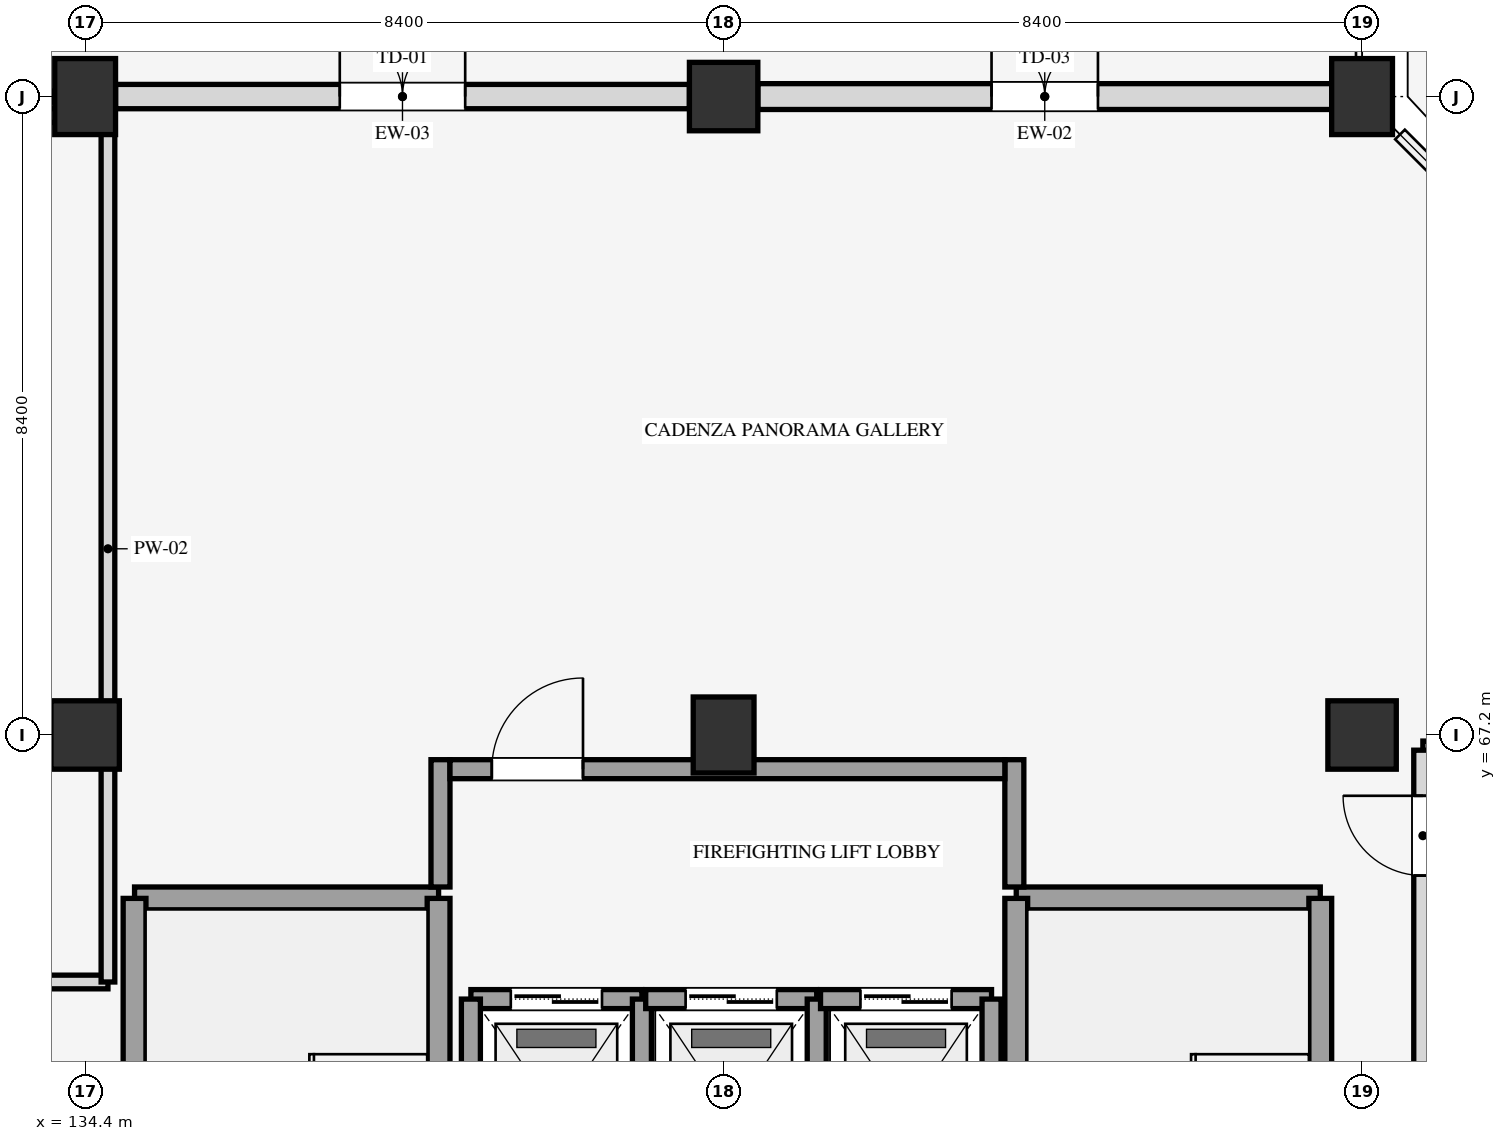
"""IFC4 building model, lengths in metres.
Left out: names, types, materials, properties, quantities, classifications, styles, units other than length and angle.
Written with IfcOpenShell. Run it as: python <this file> out.ifc"""

import sys

from ifc_helpers import new_model, si_unit, direction, frame, frame_2d, origin, origin_2d, place, context, subcontext, project, spatial, rectangle, extrude, element, fill, save


model = new_model("IFC4")
c1 = context("Model", 3, precision=1e-05, world=origin(), true_north=direction((0.0, 1.0)))
c2 = subcontext(c1, "Body", "Model", "MODEL_VIEW")
j1 = project(units=[si_unit("LENGTHUNIT", "METRE"), si_unit("PLANEANGLEUNIT", "RADIAN")], contexts=[c1])
p1 = place(None, origin())
s1 = spatial("IfcSite", under=j1, at=p1, CompositionType="ELEMENT")
p2 = place(p1, origin())
s2 = spatial("IfcBuilding", under=s1, at=p2, CompositionType="ELEMENT")
p3 = place(p2, frame((0.0, 0.0, 69.9)))
s3 = spatial("IfcBuildingStorey", under=s2, at=p3, CompositionType="ELEMENT", Elevation=69.9)
p4 = place(p3, frame((134.4, 67.2, 0.0), z_axis=(0.0, 0.0, 1.0), x_axis=(1.0, 0.0, 0.0)))
e1 = element("IfcColumn", 1, at=p4, inside=s3, PredefinedType="COLUMN", context=c2, shape_type="SweptSolid", body=[
    extrude(rectangle(XDim=0.9, YDim=0.9, at=origin_2d()), origin(), (0.0, 0.0, 1.0), 4.5),
])
for number, where, z_axis, x_axis in (
    (2, (134.4, 75.6, 0.0), (0.0, 0.0, 1.0), (1.0, 0.0, 0.0)),
    (3, (142.8, 67.2, 0.0), (0.0, 0.0, 1.0), (1.0, 0.0, 0.0)),
):
    element("IfcColumn", number, at=place(p3, frame(where, z_axis=z_axis, x_axis=x_axis)), inside=s3, PredefinedType="COLUMN", context=c2, shape_type="SweptSolid", body=[
        extrude(rectangle(XDim=0.8, YDim=1.0, at=origin_2d()), origin(), (0.0, 0.0, 1.0), 4.5),
    ])
for number, where, z_axis, x_axis in (
    (4, (142.8, 75.6, 0.0), (0.0, 0.0, 1.0), (1.0, 0.0, 0.0)),
    (5, (151.2, 67.2, 0.0), (0.0, 0.0, 1.0), (1.0, 0.0, 0.0)),
):
    element("IfcColumn", number, at=place(p3, frame(where, z_axis=z_axis, x_axis=x_axis)), inside=s3, PredefinedType="COLUMN", context=c2, shape_type="SweptSolid", body=[
        extrude(rectangle(XDim=0.9, YDim=0.9, at=origin_2d()), origin(), (0.0, 0.0, 1.0), 4.5),
    ])
p5 = place(p3, frame((151.2, 75.6, 0.0), z_axis=(0.0, 0.0, 1.0), x_axis=(1.0, 0.0, 0.0)))
e6 = element("IfcColumn", 6, at=p5, inside=s3, PredefinedType="COLUMN", context=c2, shape_type="SweptSolid", body=[
    extrude(rectangle(XDim=0.8, YDim=1.0, at=origin_2d()), origin(), (0.0, 0.0, 1.0), 4.5),
])
p6 = place(p3, frame((150.8, 75.6, 0.0), z_axis=(0.0, 0.0, 1.0), x_axis=(-1.0, 0.0, 0.0)))
e7 = element("IfcWall", 7, at=p6, inside=s3, PredefinedType="STANDARD", context=c2, shape_type="SweptSolid", body=[
    extrude(rectangle(XDim=7.55, YDim=0.34, at=frame_2d((3.775, 0.0))), origin(), (0.0, 0.0, 1.0), 3.68),
])
p7 = place(p6, frame((3.075, 0.0, 0.0)))
e8 = element("IfcOpeningElement", 8, at=p7, cuts=e7, PredefinedType="OPENING", context=c2, shape_type="SweptSolid", body=[
    extrude(rectangle(XDim=1.4, YDim=2.15, at=frame_2d((0.7, 1.075))), frame((0.0, 0.18, 0.0), z_axis=(0.0, -1.0, 0.0), x_axis=(1.0, 0.0, 0.0)), (0.0, 0.0, 1.0), 0.36),
])
p8 = place(p3, frame((142.35, 75.6, 0.0), z_axis=(0.0, 0.0, 1.0), x_axis=(-1.0, 0.0, 0.0)))
e9 = element("IfcWall", 9, at=p8, inside=s3, PredefinedType="STANDARD", context=c2, shape_type="SweptSolid", body=[
    extrude(rectangle(XDim=7.55, YDim=0.32, at=frame_2d((3.775, 0.0))), origin(), (0.0, 0.0, 1.0), 3.68),
])
p9 = place(p8, frame((2.95, 0.0, 0.0)))
e10 = element("IfcOpeningElement", 10, at=p9, cuts=e9, PredefinedType="OPENING", context=c2, shape_type="SweptSolid", body=[
    extrude(rectangle(XDim=1.65, YDim=2.2, at=frame_2d((0.825, 1.1))), frame((0.0, 0.17, 0.0), z_axis=(0.0, -1.0, 0.0), x_axis=(1.0, 0.0, 0.0)), (0.0, 0.0, 1.0), 0.34),
])
p10 = place(p3, frame((135.05, 65.05, 0.0), z_axis=(0.0, 0.0, 1.0), x_axis=(1.0, 0.0, 0.0)))
e11 = element("IfcWall", 11, at=p10, inside=s3, PredefinedType="SHEAR", context=c2, shape_type="SweptSolid", body=[
    extrude(rectangle(XDim=4.0, YDim=0.3, at=frame_2d((2.0, 0.0))), origin(), (0.0, 0.0, 1.0), 4.5),
])
for number, where, z_axis, x_axis in (
    (12, (135.05, 50.75, 0.0), (0.0, 0.0, 1.0), (0.0, 1.0, 0.0)),
    (13, (139.05, 50.75, 0.0), (0.0, 0.0, 1.0), (0.0, 1.0, 0.0)),
):
    element("IfcWall", number, at=place(p3, frame(where, z_axis=z_axis, x_axis=x_axis)), inside=s3, PredefinedType="SHEAR", context=c2, shape_type="SweptSolid", body=[
        extrude(rectangle(XDim=14.3, YDim=0.3, at=frame_2d((7.15, 0.0))), origin(), (0.0, 0.0, 1.0), 4.5),
    ])
p11 = place(p3, frame((137.25, 52.4, 0.0), z_axis=(0.0, 0.0, 1.0), x_axis=(0.0, 1.0, 0.0)))
e14 = element("IfcWall", 14, at=p11, inside=s3, PredefinedType="SHEAR", context=c2, shape_type="SweptSolid", body=[
    extrude(rectangle(XDim=11.0, YDim=0.2, at=frame_2d((5.5, 0.0))), origin(), (0.0, 0.0, 1.0), 4.5),
])
p12 = place(p3, frame((146.65, 65.05, 0.0), z_axis=(0.0, 0.0, 1.0), x_axis=(1.0, 0.0, 0.0)))
e15 = element("IfcWall", 15, at=p12, inside=s3, PredefinedType="SHEAR", context=c2, shape_type="SweptSolid", body=[
    extrude(rectangle(XDim=4.0, YDim=0.3, at=frame_2d((2.0, 0.0))), origin(), (0.0, 0.0, 1.0), 4.5),
])
for number, where, z_axis, x_axis in (
    (16, (146.65, 50.75, 0.0), (0.0, 0.0, 1.0), (0.0, 1.0, 0.0)),
    (17, (150.65, 50.75, 0.0), (0.0, 0.0, 1.0), (0.0, 1.0, 0.0)),
):
    element("IfcWall", number, at=place(p3, frame(where, z_axis=z_axis, x_axis=x_axis)), inside=s3, PredefinedType="SHEAR", context=c2, shape_type="SweptSolid", body=[
        extrude(rectangle(XDim=14.3, YDim=0.3, at=frame_2d((7.15, 0.0))), origin(), (0.0, 0.0, 1.0), 4.5),
    ])
p13 = place(p3, frame((148.85, 52.4, 0.0), z_axis=(0.0, 0.0, 1.0), x_axis=(0.0, 1.0, 0.0)))
e18 = element("IfcWall", 18, at=p13, inside=s3, PredefinedType="SHEAR", context=c2, shape_type="SweptSolid", body=[
    extrude(rectangle(XDim=11.0, YDim=0.2, at=frame_2d((5.5, 0.0))), origin(), (0.0, 0.0, 1.0), 4.5),
])
p14 = place(p3, frame((139.475, 63.725, 0.0), z_axis=(0.0, 0.0, 1.0), x_axis=(1.0, 0.0, 0.0)))
e19 = element("IfcWall", 19, at=p14, inside=s3, PredefinedType="SHEAR", context=c2, shape_type="SweptSolid", body=[
    extrude(rectangle(XDim=2.25, YDim=0.25, at=frame_2d((1.125, 0.0))), origin(), (0.0, 0.0, 1.0), 4.26),
])
p15 = place(p14, frame((0.525, 0.0, 0.0)))
e20 = element("IfcOpeningElement", 20, at=p15, cuts=e19, PredefinedType="OPENING", context=c2, shape_type="SweptSolid", body=[
    extrude(rectangle(XDim=1.2, YDim=2.18, at=frame_2d((0.6, 1.09))), frame((0.0, 0.135, 0.0), z_axis=(0.0, -1.0, 0.0), x_axis=(1.0, 0.0, 0.0)), (0.0, 0.0, 1.0), 0.27),
])
for number, where, z_axis, x_axis in (
    (21, (139.475, 60.675, 0.0), (0.0, 0.0, 1.0), (0.0, 1.0, 0.0)),
    (22, (141.725, 60.675, 0.0), (0.0, 0.0, 1.0), (0.0, 1.0, 0.0)),
):
    element("IfcWall", number, at=place(p3, frame(where, z_axis=z_axis, x_axis=x_axis)), inside=s3, PredefinedType="SHEAR", context=c2, shape_type="SweptSolid", body=[
        extrude(rectangle(XDim=3.05, YDim=0.25, at=frame_2d((1.525, 0.0))), origin(), (0.0, 0.0, 1.0), 4.26),
    ])
p16 = place(p3, frame((141.775, 63.725, 0.0), z_axis=(0.0, 0.0, 1.0), x_axis=(1.0, 0.0, 0.0)))
e23 = element("IfcWall", 23, at=p16, inside=s3, PredefinedType="SHEAR", context=c2, shape_type="SweptSolid", body=[
    extrude(rectangle(XDim=2.25, YDim=0.25, at=frame_2d((1.125, 0.0))), origin(), (0.0, 0.0, 1.0), 4.26),
])
p17 = place(p16, frame((0.525, 0.0, 0.0)))
e24 = element("IfcOpeningElement", 24, at=p17, cuts=e23, PredefinedType="OPENING", context=c2, shape_type="SweptSolid", body=[
    extrude(rectangle(XDim=1.2, YDim=2.18, at=frame_2d((0.6, 1.09))), frame((0.0, 0.135, 0.0), z_axis=(0.0, -1.0, 0.0), x_axis=(1.0, 0.0, 0.0)), (0.0, 0.0, 1.0), 0.27),
])
p18 = place(p3, frame((144.025, 60.675, 0.0), z_axis=(0.0, 0.0, 1.0), x_axis=(0.0, 1.0, 0.0)))
e25 = element("IfcWall", 25, at=p18, inside=s3, PredefinedType="SHEAR", context=c2, shape_type="SweptSolid", body=[
    extrude(rectangle(XDim=3.05, YDim=0.25, at=frame_2d((1.525, 0.0))), origin(), (0.0, 0.0, 1.0), 4.26),
])
p19 = place(p3, frame((144.075, 63.725, 0.0), z_axis=(0.0, 0.0, 1.0), x_axis=(1.0, 0.0, 0.0)))
e26 = element("IfcWall", 26, at=p19, inside=s3, PredefinedType="SHEAR", context=c2, shape_type="SweptSolid", body=[
    extrude(rectangle(XDim=2.25, YDim=0.25, at=frame_2d((1.125, 0.0))), origin(), (0.0, 0.0, 1.0), 4.26),
])
p20 = place(p19, frame((0.525, 0.0, 0.0)))
e27 = element("IfcOpeningElement", 27, at=p20, cuts=e26, PredefinedType="OPENING", context=c2, shape_type="SweptSolid", body=[
    extrude(rectangle(XDim=1.2, YDim=2.18, at=frame_2d((0.6, 1.09))), frame((0.0, 0.135, 0.0), z_axis=(0.0, -1.0, 0.0), x_axis=(1.0, 0.0, 0.0)), (0.0, 0.0, 1.0), 0.27),
])
p21 = place(p3, frame((146.325, 60.675, 0.0), z_axis=(0.0, 0.0, 1.0), x_axis=(0.0, 1.0, 0.0)))
e28 = element("IfcWall", 28, at=p21, inside=s3, PredefinedType="SHEAR", context=c2, shape_type="SweptSolid", body=[
    extrude(rectangle(XDim=3.05, YDim=0.25, at=frame_2d((1.525, 0.0))), origin(), (0.0, 0.0, 1.0), 4.26),
])
for number, where, z_axis, x_axis in (
    (29, (139.075, 65.2, 0.0), (0.0, 0.0, 1.0), (0.0, 1.0, 0.0)),
    (30, (146.625, 65.2, 0.0), (0.0, 0.0, 1.0), (0.0, 1.0, 0.0)),
):
    element("IfcWall", number, at=place(p3, frame(where, z_axis=z_axis, x_axis=x_axis)), inside=s3, PredefinedType="SHEAR", context=c2, shape_type="SweptSolid", body=[
        extrude(rectangle(XDim=1.675, YDim=0.25, at=frame_2d((0.837, 0.0))), origin(), (0.0, 0.0, 1.0), 4.26),
    ])
p22 = place(p3, frame((139.2, 66.75, 0.0), z_axis=(0.0, 0.0, 1.0), x_axis=(1.0, 0.0, 0.0)))
e31 = element("IfcWall", 31, at=p22, inside=s3, PredefinedType="SHEAR", context=c2, shape_type="SweptSolid", body=[
    extrude(rectangle(XDim=7.3, YDim=0.25, at=frame_2d((3.65, 0.0))), origin(), (0.0, 0.0, 1.0), 4.26),
])
p23 = place(p22, frame((0.55, 0.0, 0.0)))
e32 = element("IfcOpeningElement", 32, at=p23, cuts=e31, PredefinedType="OPENING", context=c2, shape_type="SweptSolid", body=[
    extrude(rectangle(XDim=1.2, YDim=2.15, at=frame_2d((0.6, 1.075))), frame((0.0, 0.135, 0.0), z_axis=(0.0, -1.0, 0.0), x_axis=(1.0, 0.0, 0.0)), (0.0, 0.0, 1.0), 0.27),
])
p24 = place(p3, frame((152.0, 67.0, 0.0), z_axis=(0.0, 0.0, 1.0), x_axis=(1.0, 0.0, 0.0)))
e33 = element("IfcWall", 33, at=p24, inside=s3, PredefinedType="PARTITIONING", context=c2, shape_type="SweptSolid", body=[
    extrude(rectangle(XDim=7.2, YDim=0.24, at=frame_2d((3.6, 0.0))), origin(), (0.0, 0.0, 1.0), 3.54),
])
p25 = place(p3, frame((152.0, 50.6, 0.0), z_axis=(0.0, 0.0, 1.0), x_axis=(0.0, 1.0, 0.0)))
e34 = element("IfcWall", 34, at=p25, inside=s3, PredefinedType="PARTITIONING", context=c2, shape_type="SweptSolid", body=[
    extrude(rectangle(XDim=16.4, YDim=0.24, at=frame_2d((8.2, 0.0))), origin(), (0.0, 0.0, 1.0), 3.54),
])
p26 = place(p25, frame((14.75, 0.0, 0.0)))
e35 = element("IfcOpeningElement", 35, at=p26, cuts=e34, PredefinedType="OPENING", context=c2, shape_type="SweptSolid", body=[
    extrude(rectangle(XDim=1.05, YDim=2.16, at=frame_2d((0.525, 1.08))), frame((0.0, 0.13, 0.0), z_axis=(0.0, -1.0, 0.0), x_axis=(1.0, 0.0, 0.0)), (0.0, 0.0, 1.0), 0.26),
])
p27 = place(p3, frame((126.35, 63.95, 0.0), z_axis=(0.0, 0.0, 1.0), x_axis=(1.0, 0.0, 0.0)))
e36 = element("IfcWall", 36, at=p27, inside=s3, PredefinedType="PARTITIONING", context=c2, shape_type="SweptSolid", body=[
    extrude(rectangle(XDim=8.35, YDim=0.18, at=frame_2d((4.175, 0.0))), origin(), (0.0, 0.0, 1.0), 3.54),
])
p28 = place(p27, frame((5.85, 0.0, 0.0)))
e37 = element("IfcOpeningElement", 37, at=p28, cuts=e36, PredefinedType="OPENING", context=c2, shape_type="SweptSolid", body=[
    extrude(rectangle(XDim=1.02, YDim=2.1, at=frame_2d((0.51, 1.05))), frame((0.0, 0.1, 0.0), z_axis=(0.0, -1.0, 0.0), x_axis=(1.0, 0.0, 0.0)), (0.0, 0.0, 1.0), 0.2),
])
p29 = place(p3, frame((126.35, 75.35, 0.0), z_axis=(0.0, 0.0, 1.0), x_axis=(1.0, 0.0, 0.0)))
e38 = element("IfcWall", 38, at=p29, inside=s3, PredefinedType="PARTITIONING", context=c2, shape_type="SweptSolid", body=[
    extrude(rectangle(XDim=8.35, YDim=0.18, at=frame_2d((4.175, 0.0))), origin(), (0.0, 0.0, 1.0), 3.54),
])
p30 = place(p3, frame((134.7, 63.95, 0.0), z_axis=(0.0, 0.0, 1.0), x_axis=(0.0, 1.0, 0.0)))
e39 = element("IfcWall", 39, at=p30, inside=s3, PredefinedType="PARTITIONING", context=c2, shape_type="SweptSolid", body=[
    extrude(rectangle(XDim=11.4, YDim=0.18, at=frame_2d((5.7, 0.0))), origin(), (0.0, 0.0, 1.0), 3.54),
])
p31 = place(p7, frame((1.4, 0.0, 0.0), z_axis=(0.0, 0.0, 1.0), x_axis=(-1.0, 0.0, 0.0)))
e40 = element("IfcDoor", 40, at=p31, inside=s3, OperationType="DOUBLE_DOOR_SINGLE_SWING", PredefinedType="DOOR", context=c2, shape_type="SweptSolid", body=[
    extrude(rectangle(XDim=1.4, YDim=2.15, at=frame_2d((0.7, 1.075))), frame((0.0, 0.025, 0.0), z_axis=(0.0, -1.0, 0.0), x_axis=(1.0, 0.0, 0.0)), (0.0, 0.0, 1.0), 0.05),
])
fill(e8, e40)
p32 = place(p9, frame((1.65, 0.0, 0.0), z_axis=(0.0, 0.0, 1.0), x_axis=(-1.0, 0.0, 0.0)))
e41 = element("IfcDoor", 41, at=p32, inside=s3, OperationType="DOUBLE_DOOR_SINGLE_SWING", PredefinedType="DOOR", context=c2, shape_type="SweptSolid", body=[
    extrude(rectangle(XDim=1.65, YDim=2.2, at=frame_2d((0.825, 1.1))), frame((0.0, 0.025, 0.0), z_axis=(0.0, -1.0, 0.0), x_axis=(1.0, 0.0, 0.0)), (0.0, 0.0, 1.0), 0.05),
])
fill(e10, e41)
p33 = place(p15, origin())
e42 = element("IfcDoor", 42, at=p33, inside=s3, OperationType="DOUBLE_DOOR_SLIDING", PredefinedType="DOOR", context=c2, shape_type="SweptSolid", body=[
    extrude(rectangle(XDim=1.2, YDim=2.18, at=frame_2d((0.6, 1.09))), frame((0.0, 0.025, 0.0), z_axis=(0.0, -1.0, 0.0), x_axis=(1.0, 0.0, 0.0)), (0.0, 0.0, 1.0), 0.05),
])
fill(e20, e42)
p34 = place(p17, origin())
e43 = element("IfcDoor", 43, at=p34, inside=s3, OperationType="DOUBLE_DOOR_SLIDING", PredefinedType="DOOR", context=c2, shape_type="SweptSolid", body=[
    extrude(rectangle(XDim=1.2, YDim=2.18, at=frame_2d((0.6, 1.09))), frame((0.0, 0.025, 0.0), z_axis=(0.0, -1.0, 0.0), x_axis=(1.0, 0.0, 0.0)), (0.0, 0.0, 1.0), 0.05),
])
fill(e24, e43)
p35 = place(p20, origin())
e44 = element("IfcDoor", 44, at=p35, inside=s3, OperationType="DOUBLE_DOOR_SLIDING", PredefinedType="DOOR", context=c2, shape_type="SweptSolid", body=[
    extrude(rectangle(XDim=1.2, YDim=2.18, at=frame_2d((0.6, 1.09))), frame((0.0, 0.025, 0.0), z_axis=(0.0, -1.0, 0.0), x_axis=(1.0, 0.0, 0.0)), (0.0, 0.0, 1.0), 0.05),
])
fill(e27, e44)
p36 = place(p23, origin())
e45 = element("IfcDoor", 45, at=p36, inside=s3, OperationType="SINGLE_SWING_RIGHT", PredefinedType="DOOR", context=c2, shape_type="SweptSolid", body=[
    extrude(rectangle(XDim=1.2, YDim=2.15, at=frame_2d((0.6, 1.075))), frame((0.0, 0.025, 0.0), z_axis=(0.0, -1.0, 0.0), x_axis=(1.0, 0.0, 0.0)), (0.0, 0.0, 1.0), 0.05),
])
fill(e32, e45)
p37 = place(p26, origin())
e46 = element("IfcDoor", 46, at=p37, inside=s3, OperationType="SINGLE_SWING_RIGHT", PredefinedType="DOOR", context=c2, shape_type="SweptSolid", body=[
    extrude(rectangle(XDim=1.05, YDim=2.16, at=frame_2d((0.525, 1.08))), frame((0.0, 0.025, 0.0), z_axis=(0.0, -1.0, 0.0), x_axis=(1.0, 0.0, 0.0)), (0.0, 0.0, 1.0), 0.05),
])
fill(e35, e46)
save(model, sys.argv[1])
